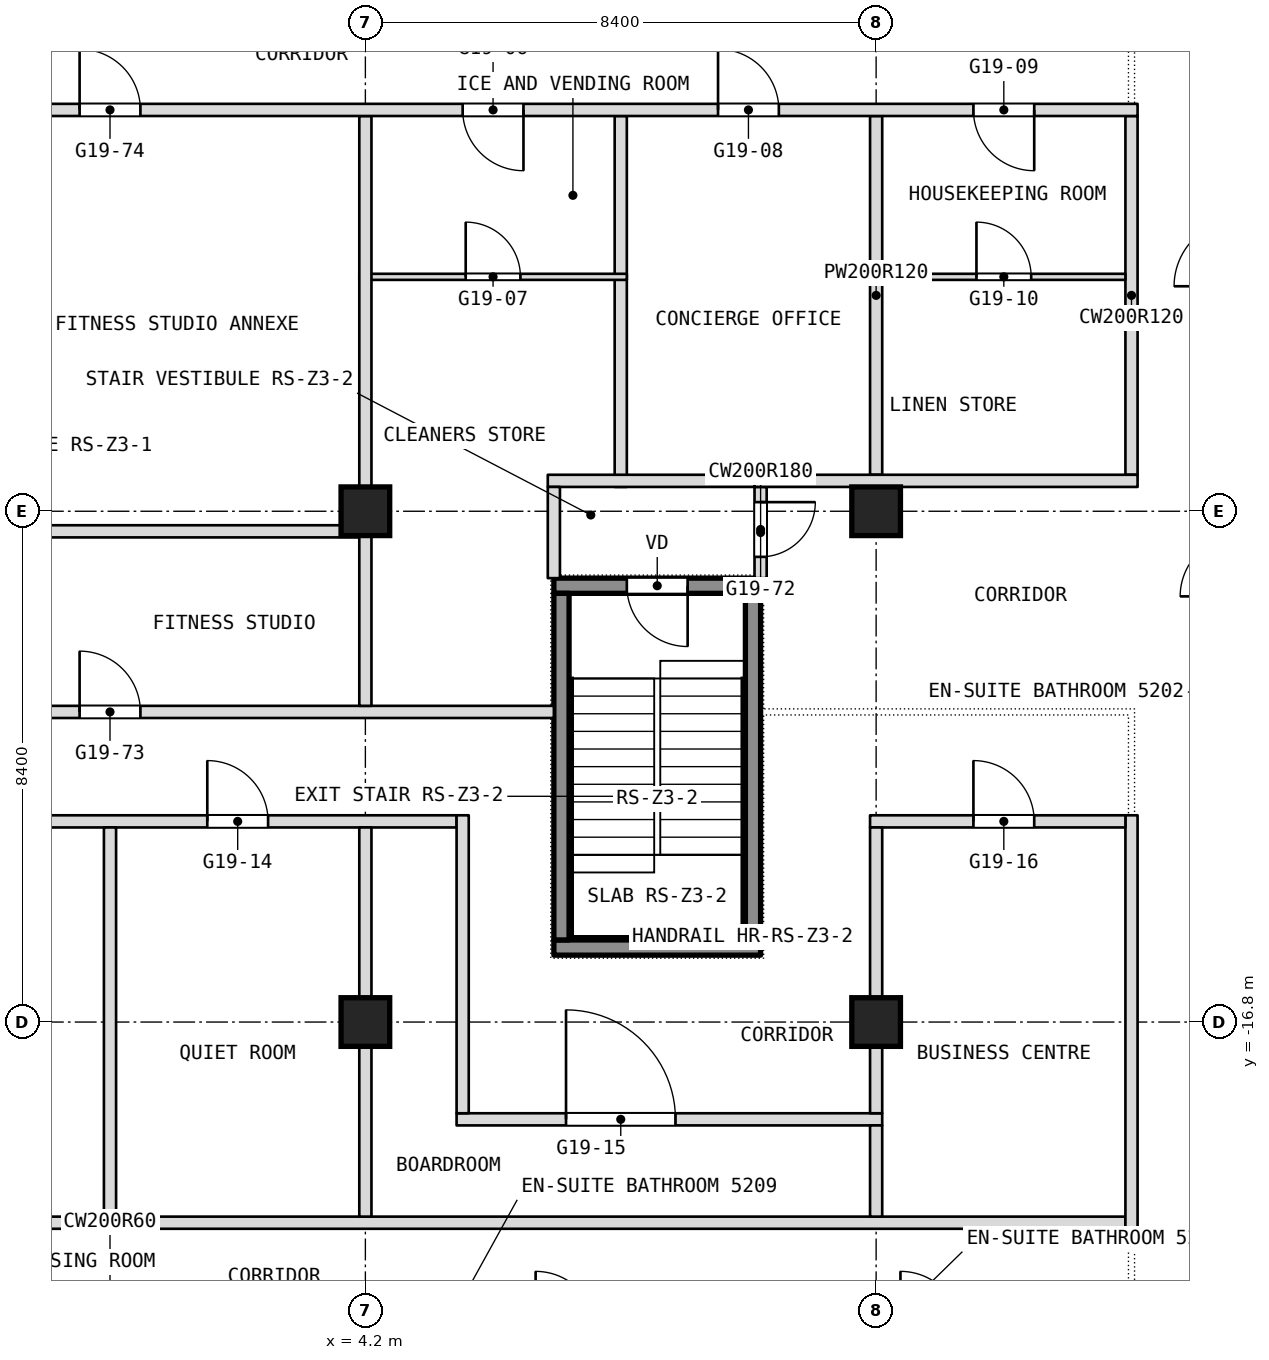
"""IFC4 building model, lengths in metres.
Left out: names, types, materials, properties, quantities, classifications, styles, units other than length and angle.
Written with IfcOpenShell. Run it as: python <this file> out.ifc"""

import sys

from ifc_helpers import new_model, si_unit, direction, frame, frame_2d, origin, origin_2d, place, context, subcontext, project, spatial, rectangle, extrude, element, fill, save


model = new_model("IFC4")
c1 = context("Model", 3, precision=1e-05, world=origin(), true_north=direction((0.0, 1.0)))
c2 = subcontext(c1, "Body", "Model", "MODEL_VIEW")
j1 = project(units=[si_unit("LENGTHUNIT", "METRE"), si_unit("PLANEANGLEUNIT", "RADIAN")], contexts=[c1])
p1 = place(None, origin())
s1 = spatial("IfcSite", under=j1, at=p1, CompositionType="ELEMENT")
p2 = place(p1, origin())
s2 = spatial("IfcBuilding", under=s1, at=p2, CompositionType="ELEMENT")
p3 = place(p2, frame((0.0, 0.0, 223.7)))
s3 = spatial("IfcBuildingStorey", under=s2, at=p3, CompositionType="ELEMENT", Elevation=223.7)
for number, where, z_axis, x_axis in (
    (1, (4.2, -16.8, 0.0), (0.0, 0.0, 1.0), (1.0, 0.0, 0.0)),
    (2, (4.2, -8.4, 0.0), (0.0, 0.0, 1.0), (1.0, 0.0, 0.0)),
    (3, (12.6, -16.8, 0.0), (0.0, 0.0, 1.0), (1.0, 0.0, 0.0)),
    (4, (12.6, -8.4, 0.0), (0.0, 0.0, 1.0), (1.0, 0.0, 0.0)),
):
    element("IfcColumn", number, at=place(p3, frame(where, z_axis=z_axis, x_axis=x_axis)), inside=s3, PredefinedType="COLUMN", context=c2, shape_type="SweptSolid", body=[
        extrude(rectangle(XDim=0.8, YDim=0.8, at=origin_2d()), origin(), (0.0, 0.0, 1.0), 3.6),
    ])
p4 = place(p3, frame((-16.7, -20.1, 0.0), z_axis=(0.0, 0.0, 1.0), x_axis=(1.0, 0.0, 0.0)))
e5 = element("IfcWall", 5, at=p4, inside=s3, PredefinedType="PARTITIONING", context=c2, shape_type="SweptSolid", body=[
    extrude(rectangle(XDim=33.4, YDim=0.2, at=frame_2d((16.7, 0.0))), origin(), (0.0, 0.0, 1.0), 3.34),
])
p5 = place(p3, frame((5.7, -18.4, 0.0), z_axis=(0.0, 0.0, 1.0), x_axis=(1.0, 0.0, 0.0)))
e6 = element("IfcWall", 6, at=p5, inside=s3, PredefinedType="PARTITIONING", context=c2, shape_type="SweptSolid", body=[
    extrude(rectangle(XDim=7.0, YDim=0.2, at=frame_2d((3.5, 0.0))), origin(), (0.0, 0.0, 1.0), 3.34),
])
p6 = place(p5, frame((1.8, 0.0, 0.0)))
e7 = element("IfcOpeningElement", 7, at=p6, cuts=e6, PredefinedType="OPENING", context=c2, shape_type="SweptSolid", body=[
    extrude(rectangle(XDim=1.8, YDim=2.1, at=frame_2d((0.9, 1.05))), frame((0.0, 0.1, 0.0), z_axis=(0.0, -1.0, 0.0), x_axis=(1.0, 0.0, 0.0)), (0.0, 0.0, 1.0), 0.2),
])
p7 = place(p3, frame((16.8, -20.2, 0.0), z_axis=(0.0, 0.0, 1.0), x_axis=(0.0, 1.0, 0.0)))
e8 = element("IfcWall", 8, at=p7, inside=s3, PredefinedType="PARTITIONING", context=c2, shape_type="SweptSolid", body=[
    extrude(rectangle(XDim=6.8, YDim=0.2, at=frame_2d((3.4, 0.0))), origin(), (0.0, 0.0, 1.0), 3.34),
])
p8 = place(p3, frame((16.8, -7.8, 0.0), z_axis=(0.0, 0.0, 1.0), x_axis=(0.0, 1.0, 0.0)))
e9 = element("IfcWall", 9, at=p8, inside=s3, PredefinedType="PARTITIONING", context=c2, shape_type="SweptSolid", body=[
    extrude(rectangle(XDim=5.9, YDim=0.2, at=frame_2d((2.95, 0.0))), origin(), (0.0, 0.0, 1.0), 3.34),
])
p9 = place(p3, frame((-5.9, -13.5, 0.0), z_axis=(0.0, 0.0, 1.0), x_axis=(1.0, 0.0, 0.0)))
e10 = element("IfcWall", 10, at=p9, inside=s3, PredefinedType="PARTITIONING", context=c2, shape_type="SweptSolid", body=[
    extrude(rectangle(XDim=11.6, YDim=0.2, at=frame_2d((5.8, 0.0))), origin(), (0.0, 0.0, 1.0), 3.34),
])
p10 = place(p9, frame((3.3, 0.0, 0.0)))
e11 = element("IfcOpeningElement", 11, at=p10, cuts=e10, PredefinedType="OPENING", context=c2, shape_type="SweptSolid", body=[
    extrude(rectangle(XDim=1.0, YDim=2.1, at=frame_2d((0.5, 1.05))), frame((0.0, 0.1, 0.0), z_axis=(0.0, -1.0, 0.0), x_axis=(1.0, 0.0, 0.0)), (0.0, 0.0, 1.0), 0.2),
])
p11 = place(p9, frame((7.5, 0.0, 0.0)))
e12 = element("IfcOpeningElement", 12, at=p11, cuts=e10, PredefinedType="OPENING", context=c2, shape_type="SweptSolid", body=[
    extrude(rectangle(XDim=1.0, YDim=2.1, at=frame_2d((0.5, 1.05))), frame((0.0, 0.1, 0.0), z_axis=(0.0, -1.0, 0.0), x_axis=(1.0, 0.0, 0.0)), (0.0, 0.0, 1.0), 0.2),
])
p12 = place(p3, frame((12.5, -13.5, 0.0), z_axis=(0.0, 0.0, 1.0), x_axis=(1.0, 0.0, 0.0)))
e13 = element("IfcWall", 13, at=p12, inside=s3, PredefinedType="PARTITIONING", context=c2, shape_type="SweptSolid", body=[
    extrude(rectangle(XDim=4.2, YDim=0.2, at=frame_2d((2.1, 0.0))), origin(), (0.0, 0.0, 1.0), 3.34),
])
p13 = place(p12, frame((1.7, 0.0, 0.0)))
e14 = element("IfcOpeningElement", 14, at=p13, cuts=e13, PredefinedType="OPENING", context=c2, shape_type="SweptSolid", body=[
    extrude(rectangle(XDim=1.0, YDim=2.1, at=frame_2d((0.5, 1.05))), frame((0.0, 0.1, 0.0), z_axis=(0.0, -1.0, 0.0), x_axis=(1.0, 0.0, 0.0)), (0.0, 0.0, 1.0), 0.2),
])
p14 = place(p3, frame((12.6, -20.0, 0.0), z_axis=(0.0, 0.0, 1.0), x_axis=(0.0, 1.0, 0.0)))
e15 = element("IfcWall", 15, at=p14, inside=s3, PredefinedType="PARTITIONING", context=c2, shape_type="SweptSolid", body=[
    extrude(rectangle(XDim=1.5, YDim=0.2, at=frame_2d((0.75, 0.0))), origin(), (0.0, 0.0, 1.0), 3.34),
])
p15 = place(p3, frame((12.6, -7.8, 0.0), z_axis=(0.0, 0.0, 1.0), x_axis=(0.0, 1.0, 0.0)))
e16 = element("IfcWall", 16, at=p15, inside=s3, PredefinedType="PARTITIONING", context=c2, shape_type="SweptSolid", body=[
    extrude(rectangle(XDim=5.9, YDim=0.2, at=frame_2d((2.95, 0.0))), origin(), (0.0, 0.0, 1.0), 3.34),
])
p16 = place(p3, frame((12.6, -18.3, 0.0), z_axis=(0.0, 0.0, 1.0), x_axis=(0.0, 1.0, 0.0)))
e17 = element("IfcWall", 17, at=p16, inside=s3, PredefinedType="PARTITIONING", context=c2, shape_type="SweptSolid", body=[
    extrude(rectangle(XDim=4.7, YDim=0.2, at=frame_2d((2.35, 0.0))), origin(), (0.0, 0.0, 1.0), 3.34),
])
p17 = place(p3, frame((-7.3, -11.7, 0.0), z_axis=(0.0, 0.0, 1.0), x_axis=(1.0, 0.0, 0.0)))
e18 = element("IfcWall", 18, at=p17, inside=s3, PredefinedType="PARTITIONING", context=c2, shape_type="SweptSolid", body=[
    extrude(rectangle(XDim=14.6, YDim=0.2, at=frame_2d((7.3, 0.0))), origin(), (0.0, 0.0, 1.0), 3.34),
])
p18 = place(p17, frame((6.8, 0.0, 0.0)))
e19 = element("IfcOpeningElement", 19, at=p18, cuts=e18, PredefinedType="OPENING", context=c2, shape_type="SweptSolid", body=[
    extrude(rectangle(XDim=1.0, YDim=2.1, at=frame_2d((0.5, 1.05))), frame((0.0, 0.1, 0.0), z_axis=(0.0, -1.0, 0.0), x_axis=(1.0, 0.0, 0.0)), (0.0, 0.0, 1.0), 0.2),
])
p19 = place(p3, frame((10.7, -9.5, 0.0), z_axis=(0.0, 0.0, 1.0), x_axis=(0.0, 1.0, 0.0)))
e20 = element("IfcWall", 20, at=p19, inside=s3, PredefinedType="PARTITIONING", context=c2, shape_type="SweptSolid", body=[
    extrude(rectangle(XDim=1.5, YDim=0.2, at=frame_2d((0.75, 0.0))), origin(), (0.0, 0.0, 1.0), 3.34),
])
p20 = place(p19, frame((0.35, 0.0, 0.0)))
e21 = element("IfcOpeningElement", 21, at=p20, cuts=e20, PredefinedType="OPENING", context=c2, shape_type="SweptSolid", body=[
    extrude(rectangle(XDim=0.9, YDim=2.1, at=frame_2d((0.45, 1.05))), frame((0.0, 0.1, 0.0), z_axis=(0.0, -1.0, 0.0), x_axis=(1.0, 0.0, 0.0)), (0.0, 0.0, 1.0), 0.2),
])
p21 = place(p3, frame((-4.1, -8.73, 0.0), z_axis=(0.0, 0.0, 1.0), x_axis=(1.0, 0.0, 0.0)))
e22 = element("IfcWall", 22, at=p21, inside=s3, PredefinedType="PARTITIONING", context=c2, shape_type="SweptSolid", body=[
    extrude(rectangle(XDim=8.2, YDim=0.2, at=frame_2d((4.1, 0.0))), origin(), (0.0, 0.0, 1.0), 3.34),
])
p22 = place(p3, frame((8.4, -8.0, 0.0), z_axis=(0.0, 0.0, 1.0), x_axis=(0.0, 1.0, 0.0)))
e23 = element("IfcWall", 23, at=p22, inside=s3, PredefinedType="PARTITIONING", context=c2, shape_type="SweptSolid", body=[
    extrude(rectangle(XDim=6.1, YDim=0.2, at=frame_2d((3.05, 0.0))), origin(), (0.0, 0.0, 1.0), 3.34),
])
p23 = place(p3, frame((10.6, -7.9, 0.0), z_axis=(0.0, 0.0, 1.0), x_axis=(1.0, 0.0, 0.0)))
e24 = element("IfcWall", 24, at=p23, inside=s3, PredefinedType="PARTITIONING", context=c2, shape_type="SweptSolid", body=[
    extrude(rectangle(XDim=6.3, YDim=0.2, at=frame_2d((3.15, 0.0))), origin(), (0.0, 0.0, 1.0), 3.34),
])
p24 = place(p3, frame((7.2, -7.9, 0.0), z_axis=(0.0, 0.0, 1.0), x_axis=(1.0, 0.0, 0.0)))
e25 = element("IfcWall", 25, at=p24, inside=s3, PredefinedType="PARTITIONING", context=c2, shape_type="SweptSolid", body=[
    extrude(rectangle(XDim=3.4, YDim=0.2, at=frame_2d((1.7, 0.0))), origin(), (0.0, 0.0, 1.0), 3.34),
])
p25 = place(p3, frame((7.3, -9.5, 0.0), z_axis=(0.0, 0.0, 1.0), x_axis=(0.0, 1.0, 0.0)))
e26 = element("IfcWall", 26, at=p25, inside=s3, PredefinedType="PARTITIONING", context=c2, shape_type="SweptSolid", body=[
    extrude(rectangle(XDim=1.5, YDim=0.2, at=frame_2d((0.75, 0.0))), origin(), (0.0, 0.0, 1.0), 3.34),
])
p26 = place(p3, frame((5.8, -18.3, 0.0), z_axis=(0.0, 0.0, 1.0), x_axis=(0.0, 1.0, 0.0)))
e27 = element("IfcWall", 27, at=p26, inside=s3, PredefinedType="PARTITIONING", context=c2, shape_type="SweptSolid", body=[
    extrude(rectangle(XDim=4.9, YDim=0.2, at=frame_2d((2.45, 0.0))), origin(), (0.0, 0.0, 1.0), 3.34),
])
p27 = place(p3, frame((4.1, -4.545, 0.0), z_axis=(0.0, 0.0, 1.0), x_axis=(1.0, 0.0, 0.0)))
e28 = element("IfcWall", 28, at=p27, inside=s3, PredefinedType="PARTITIONING", context=c2, shape_type="SweptSolid", body=[
    extrude(rectangle(XDim=4.4, YDim=0.1, at=frame_2d((2.2, 0.0))), origin(), (0.0, 0.0, 1.0), 3.34),
])
p28 = place(p27, frame((1.75, 0.0, 0.0)))
e29 = element("IfcOpeningElement", 29, at=p28, cuts=e28, PredefinedType="OPENING", context=c2, shape_type="SweptSolid", body=[
    extrude(rectangle(XDim=0.9, YDim=2.1, at=frame_2d((0.45, 1.05))), frame((0.0, 0.05, 0.0), z_axis=(0.0, -1.0, 0.0), x_axis=(1.0, 0.0, 0.0)), (0.0, 0.0, 1.0), 0.1),
])
p29 = place(p3, frame((12.7, -4.545, 0.0), z_axis=(0.0, 0.0, 1.0), x_axis=(1.0, 0.0, 0.0)))
e30 = element("IfcWall", 30, at=p29, inside=s3, PredefinedType="PARTITIONING", context=c2, shape_type="SweptSolid", body=[
    extrude(rectangle(XDim=4.0, YDim=0.1, at=frame_2d((2.0, 0.0))), origin(), (0.0, 0.0, 1.0), 3.34),
])
p30 = place(p29, frame((1.55, 0.0, 0.0)))
e31 = element("IfcOpeningElement", 31, at=p30, cuts=e30, PredefinedType="OPENING", context=c2, shape_type="SweptSolid", body=[
    extrude(rectangle(XDim=0.9, YDim=2.1, at=frame_2d((0.45, 1.05))), frame((0.0, 0.05, 0.0), z_axis=(0.0, -1.0, 0.0), x_axis=(1.0, 0.0, 0.0)), (0.0, 0.0, 1.0), 0.1),
])
p31 = place(p3, frame((4.2, -20.0, 0.0), z_axis=(0.0, 0.0, 1.0), x_axis=(0.0, 1.0, 0.0)))
e32 = element("IfcWall", 32, at=p31, inside=s3, PredefinedType="PARTITIONING", context=c2, shape_type="SweptSolid", body=[
    extrude(rectangle(XDim=6.4, YDim=0.2, at=frame_2d((3.2, 0.0))), origin(), (0.0, 0.0, 1.0), 3.34),
])
p32 = place(p3, frame((4.2, -11.6, 0.0), z_axis=(0.0, 0.0, 1.0), x_axis=(0.0, 1.0, 0.0)))
e33 = element("IfcWall", 33, at=p32, inside=s3, PredefinedType="PARTITIONING", context=c2, shape_type="SweptSolid", body=[
    extrude(rectangle(XDim=9.7, YDim=0.2, at=frame_2d((4.85, 0.0))), origin(), (0.0, 0.0, 1.0), 3.34),
])
p33 = place(p3, frame((-16.9, -1.8, 0.0), z_axis=(0.0, 0.0, 1.0), x_axis=(1.0, 0.0, 0.0)))
e34 = element("IfcWall", 34, at=p33, inside=s3, PredefinedType="PARTITIONING", context=c2, shape_type="SweptSolid", body=[
    extrude(rectangle(XDim=33.8, YDim=0.2, at=frame_2d((16.9, 0.0))), origin(), (0.0, 0.0, 1.0), 3.34),
])
p34 = place(p33, frame((1.7, 0.0, 0.0)))
e35 = element("IfcOpeningElement", 35, at=p34, cuts=e34, PredefinedType="OPENING", context=c2, shape_type="SweptSolid", body=[
    extrude(rectangle(XDim=1.0, YDim=2.1, at=frame_2d((0.5, 1.05))), frame((0.0, 0.1, 0.0), z_axis=(0.0, -1.0, 0.0), x_axis=(1.0, 0.0, 0.0)), (0.0, 0.0, 1.0), 0.2),
])
p35 = place(p33, frame((5.9, 0.0, 0.0)))
e36 = element("IfcOpeningElement", 36, at=p35, cuts=e34, PredefinedType="OPENING", context=c2, shape_type="SweptSolid", body=[
    extrude(rectangle(XDim=1.0, YDim=2.1, at=frame_2d((0.5, 1.05))), frame((0.0, 0.1, 0.0), z_axis=(0.0, -1.0, 0.0), x_axis=(1.0, 0.0, 0.0)), (0.0, 0.0, 1.0), 0.2),
])
p36 = place(p33, frame((10.1, 0.0, 0.0)))
e37 = element("IfcOpeningElement", 37, at=p36, cuts=e34, PredefinedType="OPENING", context=c2, shape_type="SweptSolid", body=[
    extrude(rectangle(XDim=1.0, YDim=2.1, at=frame_2d((0.5, 1.05))), frame((0.0, 0.1, 0.0), z_axis=(0.0, -1.0, 0.0), x_axis=(1.0, 0.0, 0.0)), (0.0, 0.0, 1.0), 0.2),
])
p37 = place(p33, frame((22.7, 0.0, 0.0)))
e38 = element("IfcOpeningElement", 38, at=p37, cuts=e34, PredefinedType="OPENING", context=c2, shape_type="SweptSolid", body=[
    extrude(rectangle(XDim=1.0, YDim=2.1, at=frame_2d((0.5, 1.05))), frame((0.0, 0.1, 0.0), z_axis=(0.0, -1.0, 0.0), x_axis=(1.0, 0.0, 0.0)), (0.0, 0.0, 1.0), 0.2),
])
p38 = place(p33, frame((26.9, 0.0, 0.0)))
e39 = element("IfcOpeningElement", 39, at=p38, cuts=e34, PredefinedType="OPENING", context=c2, shape_type="SweptSolid", body=[
    extrude(rectangle(XDim=1.0, YDim=2.1, at=frame_2d((0.5, 1.05))), frame((0.0, 0.1, 0.0), z_axis=(0.0, -1.0, 0.0), x_axis=(1.0, 0.0, 0.0)), (0.0, 0.0, 1.0), 0.2),
])
p39 = place(p33, frame((31.1, 0.0, 0.0)))
e40 = element("IfcOpeningElement", 40, at=p39, cuts=e34, PredefinedType="OPENING", context=c2, shape_type="SweptSolid", body=[
    extrude(rectangle(XDim=1.0, YDim=2.1, at=frame_2d((0.5, 1.05))), frame((0.0, 0.1, 0.0), z_axis=(0.0, -1.0, 0.0), x_axis=(1.0, 0.0, 0.0)), (0.0, 0.0, 1.0), 0.2),
])
p40 = place(p33, frame((16.4, 0.0, 0.0)))
e41 = element("IfcOpeningElement", 41, at=p40, cuts=e34, PredefinedType="OPENING", context=c2, shape_type="SweptSolid", body=[
    extrude(rectangle(XDim=1.0, YDim=2.1, at=frame_2d((0.5, 1.05))), frame((0.0, 0.1, 0.0), z_axis=(0.0, -1.0, 0.0), x_axis=(1.0, 0.0, 0.0)), (0.0, 0.0, 1.0), 0.2),
])
p41 = place(p3, frame((0.0, -20.0, 0.0), z_axis=(0.0, 0.0, 1.0), x_axis=(0.0, 1.0, 0.0)))
e42 = element("IfcWall", 42, at=p41, inside=s3, PredefinedType="PARTITIONING", context=c2, shape_type="SweptSolid", body=[
    extrude(rectangle(XDim=6.4, YDim=0.2, at=frame_2d((3.2, 0.0))), origin(), (0.0, 0.0, 1.0), 3.34),
])
p42 = place(p3, frame((7.3, -15.575, 0.1), z_axis=(0.0, 0.0, 1.0), x_axis=(1.0, 0.0, 0.0)))
e43 = element("IfcWall", 43, at=p42, inside=s3, PredefinedType="SHEAR", context=c2, shape_type="SweptSolid", body=[
    extrude(rectangle(XDim=3.4, YDim=0.25, at=frame_2d((1.7, 0.0))), origin(), (0.0, 0.0, 1.0), 3.6),
])
p43 = place(p3, frame((7.3, -9.625, 0.1), z_axis=(0.0, 0.0, 1.0), x_axis=(1.0, 0.0, 0.0)))
e44 = element("IfcWall", 44, at=p43, inside=s3, PredefinedType="SHEAR", context=c2, shape_type="SweptSolid", body=[
    extrude(rectangle(XDim=3.4, YDim=0.25, at=frame_2d((1.7, 0.0))), origin(), (0.0, 0.0, 1.0), 3.6),
])
p44 = place(p43, frame((1.2, 0.0, 0.0)))
e45 = element("IfcOpeningElement", 45, at=p44, cuts=e44, PredefinedType="OPENING", context=c2, shape_type="SweptSolid", body=[
    extrude(rectangle(XDim=1.0, YDim=2.1, at=frame_2d((0.5, 1.05))), frame((0.0, 0.125, 0.0), z_axis=(0.0, -1.0, 0.0), x_axis=(1.0, 0.0, 0.0)), (0.0, 0.0, 1.0), 0.25),
])
for number, where, z_axis, x_axis in (
    (46, (7.425, -15.45, 0.1), (0.0, 0.0, 1.0), (0.0, 1.0, 0.0)),
    (47, (10.575, -15.45, 0.1), (0.0, 0.0, 1.0), (0.0, 1.0, 0.0)),
):
    element("IfcWall", number, at=place(p3, frame(where, z_axis=z_axis, x_axis=x_axis)), inside=s3, PredefinedType="SHEAR", context=c2, shape_type="SweptSolid", body=[
        extrude(rectangle(XDim=5.7, YDim=0.25, at=frame_2d((2.85, 0.0))), origin(), (0.0, 0.0, 1.0), 3.6),
    ])
p45 = place(p6, origin())
e48 = element("IfcDoor", 48, at=p45, inside=s3, OperationType="DOUBLE_DOOR_SINGLE_SWING", PredefinedType="DOOR", context=c2, shape_type="SweptSolid", body=[
    extrude(rectangle(XDim=1.8, YDim=2.1, at=frame_2d((0.9, 1.05))), frame((0.0, 0.025, 0.0), z_axis=(0.0, -1.0, 0.0), x_axis=(1.0, 0.0, 0.0)), (0.0, 0.0, 1.0), 0.05),
])
fill(e7, e48)
p46 = place(p11, origin())
e49 = element("IfcDoor", 49, at=p46, inside=s3, OperationType="SINGLE_SWING_RIGHT", PredefinedType="DOOR", context=c2, shape_type="SweptSolid", body=[
    extrude(rectangle(XDim=1.0, YDim=2.1, at=frame_2d((0.5, 1.05))), frame((0.0, 0.025, 0.0), z_axis=(0.0, -1.0, 0.0), x_axis=(1.0, 0.0, 0.0)), (0.0, 0.0, 1.0), 0.05),
])
fill(e12, e49)
p47 = place(p13, origin())
e50 = element("IfcDoor", 50, at=p47, inside=s3, OperationType="SINGLE_SWING_RIGHT", PredefinedType="DOOR", context=c2, shape_type="SweptSolid", body=[
    extrude(rectangle(XDim=1.0, YDim=2.1, at=frame_2d((0.5, 1.05))), frame((0.0, 0.025, 0.0), z_axis=(0.0, -1.0, 0.0), x_axis=(1.0, 0.0, 0.0)), (0.0, 0.0, 1.0), 0.05),
])
fill(e14, e50)
p48 = place(p18, origin())
e51 = element("IfcDoor", 51, at=p48, inside=s3, OperationType="SINGLE_SWING_LEFT", PredefinedType="DOOR", context=c2, shape_type="SweptSolid", body=[
    extrude(rectangle(XDim=1.0, YDim=2.1, at=frame_2d((0.5, 1.05))), frame((0.0, 0.025, 0.0), z_axis=(0.0, -1.0, 0.0), x_axis=(1.0, 0.0, 0.0)), (0.0, 0.0, 1.0), 0.05),
])
fill(e19, e51)
p49 = place(p20, origin())
e52 = element("IfcDoor", 52, at=p49, inside=s3, OperationType="SINGLE_SWING_RIGHT", PredefinedType="DOOR", context=c2, shape_type="SweptSolid", body=[
    extrude(rectangle(XDim=0.9, YDim=2.1, at=frame_2d((0.45, 1.05))), frame((0.0, 0.025, 0.0), z_axis=(0.0, -1.0, 0.0), x_axis=(1.0, 0.0, 0.0)), (0.0, 0.0, 1.0), 0.05),
])
fill(e21, e52)
p50 = place(p28, origin())
e53 = element("IfcDoor", 53, at=p50, inside=s3, OperationType="SINGLE_SWING_LEFT", PredefinedType="DOOR", context=c2, shape_type="SweptSolid", body=[
    extrude(rectangle(XDim=0.9, YDim=2.1, at=frame_2d((0.45, 1.05))), frame((0.0, 0.025, 0.0), z_axis=(0.0, -1.0, 0.0), x_axis=(1.0, 0.0, 0.0)), (0.0, 0.0, 1.0), 0.05),
])
fill(e29, e53)
p51 = place(p30, origin())
e54 = element("IfcDoor", 54, at=p51, inside=s3, OperationType="SINGLE_SWING_RIGHT", PredefinedType="DOOR", context=c2, shape_type="SweptSolid", body=[
    extrude(rectangle(XDim=0.9, YDim=2.1, at=frame_2d((0.45, 1.05))), frame((0.0, 0.025, 0.0), z_axis=(0.0, -1.0, 0.0), x_axis=(1.0, 0.0, 0.0)), (0.0, 0.0, 1.0), 0.05),
])
fill(e31, e54)
p52 = place(p37, origin())
e55 = element("IfcDoor", 55, at=p52, inside=s3, OperationType="SINGLE_SWING_RIGHT", PredefinedType="DOOR", context=c2, shape_type="SweptSolid", body=[
    extrude(rectangle(XDim=1.0, YDim=2.1, at=frame_2d((0.5, 1.05))), frame((0.0, 0.025, 0.0), z_axis=(0.0, -1.0, 0.0), x_axis=(1.0, 0.0, 0.0)), (0.0, 0.0, 1.0), 0.05),
])
fill(e38, e55)
p53 = place(p38, origin())
e56 = element("IfcDoor", 56, at=p53, inside=s3, OperationType="SINGLE_SWING_LEFT", PredefinedType="DOOR", context=c2, shape_type="SweptSolid", body=[
    extrude(rectangle(XDim=1.0, YDim=2.1, at=frame_2d((0.5, 1.05))), frame((0.0, 0.025, 0.0), z_axis=(0.0, -1.0, 0.0), x_axis=(1.0, 0.0, 0.0)), (0.0, 0.0, 1.0), 0.05),
])
fill(e39, e56)
p54 = place(p39, origin())
e57 = element("IfcDoor", 57, at=p54, inside=s3, OperationType="SINGLE_SWING_LEFT", PredefinedType="DOOR", context=c2, shape_type="SweptSolid", body=[
    extrude(rectangle(XDim=1.0, YDim=2.1, at=frame_2d((0.5, 1.05))), frame((0.0, 0.025, 0.0), z_axis=(0.0, -1.0, 0.0), x_axis=(1.0, 0.0, 0.0)), (0.0, 0.0, 1.0), 0.05),
])
fill(e40, e57)
p55 = place(p40, origin())
e58 = element("IfcDoor", 58, at=p55, inside=s3, OperationType="SINGLE_SWING_LEFT", PredefinedType="DOOR", context=c2, shape_type="SweptSolid", body=[
    extrude(rectangle(XDim=1.0, YDim=2.1, at=frame_2d((0.5, 1.05))), frame((0.0, 0.025, 0.0), z_axis=(0.0, -1.0, 0.0), x_axis=(1.0, 0.0, 0.0)), (0.0, 0.0, 1.0), 0.05),
])
fill(e41, e58)
p56 = place(p44, origin())
e59 = element("IfcDoor", 59, at=p56, inside=s3, OperationType="SINGLE_SWING_LEFT", PredefinedType="DOOR", context=c2, shape_type="SweptSolid", body=[
    extrude(rectangle(XDim=1.0, YDim=2.1, at=frame_2d((0.5, 1.05))), frame((0.0, 0.025, 0.0), z_axis=(0.0, -1.0, 0.0), x_axis=(1.0, 0.0, 0.0)), (0.0, 0.0, 1.0), 0.05),
])
fill(e45, e59)
save(model, sys.argv[1])
